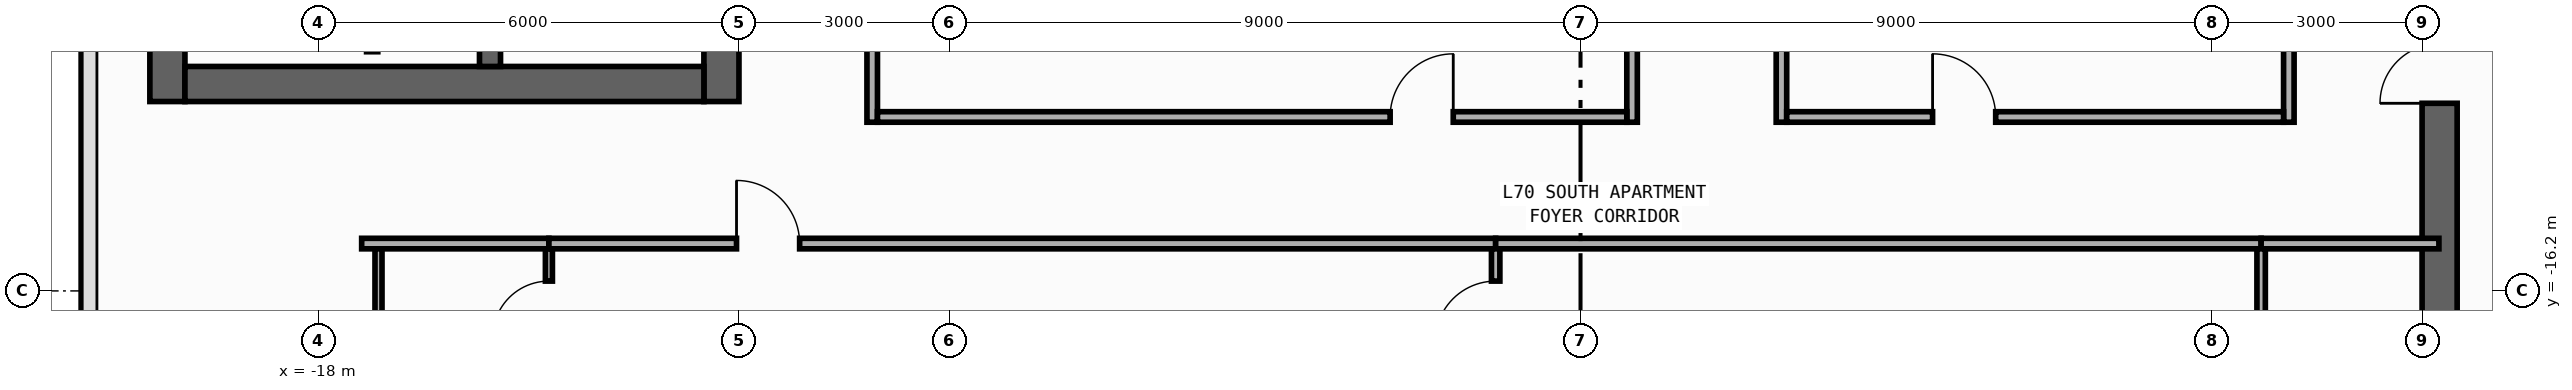
"""IFC4 building model, lengths in metres.
Left out: names, types, materials, properties, quantities, classifications, styles, units other than length and angle.
Written with IfcOpenShell. Run it as: python <this file> out.ifc"""

import sys

from ifc_helpers import new_model, si_unit, direction, frame, frame_2d, origin, place, context, subcontext, project, spatial, rectangle, extrude, element, fill, save


model = new_model("IFC4")
c1 = context("Model", 3, precision=1e-05, world=origin(), true_north=direction((0.0, 1.0)))
c2 = subcontext(c1, "Body", "Model", "MODEL_VIEW")
j1 = project(units=[si_unit("LENGTHUNIT", "METRE"), si_unit("PLANEANGLEUNIT", "RADIAN")], contexts=[c1])
p1 = place(None, origin())
s1 = spatial("IfcSite", under=j1, at=p1, CompositionType="ELEMENT")
p2 = place(p1, origin())
s2 = spatial("IfcBuilding", under=s1, at=p2, CompositionType="ELEMENT")
p3 = place(p2, frame((0.0, 0.0, 292.8)))
s3 = spatial("IfcBuildingStorey", under=s2, at=p3, CompositionType="ELEMENT", Elevation=292.8)
p4 = place(p3, frame((-20.15, -13.5, 0.0), z_axis=(0.0, 0.0, 1.0), x_axis=(0.0, 1.0, 0.0)))
e1 = element("IfcWall", 1, at=p4, inside=s3, PredefinedType="SHEAR", context=c2, shape_type="SweptSolid", body=[
    extrude(rectangle(XDim=27.0, YDim=0.5, at=frame_2d((13.5, 0.0))), origin(), (0.0, 0.0, 1.0), 3.54),
])
p5 = place(p3, frame((-12.25, -13.5, 0.0), z_axis=(0.0, 0.0, 1.0), x_axis=(0.0, 1.0, 0.0)))
e2 = element("IfcWall", 2, at=p5, inside=s3, PredefinedType="SHEAR", context=c2, shape_type="SweptSolid", body=[
    extrude(rectangle(XDim=27.0, YDim=0.5, at=frame_2d((13.5, 0.0))), origin(), (0.0, 0.0, 1.0), 3.54),
])
p6 = place(p5, frame((15.175, 0.0, 0.0)))
e3 = element("IfcOpeningElement", 3, at=p6, cuts=e2, PredefinedType="OPENING", context=c2, shape_type="SweptSolid", body=[
    extrude(rectangle(XDim=0.85, YDim=2.1, at=frame_2d((0.425, 1.05))), frame((0.0, 0.26, 0.0), z_axis=(0.0, -1.0, 0.0), x_axis=(1.0, 0.0, 0.0)), (0.0, 0.0, 1.0), 0.52),
])
p7 = place(p5, frame((21.275, 0.0, 0.0)))
e4 = element("IfcOpeningElement", 4, at=p7, cuts=e2, PredefinedType="OPENING", context=c2, shape_type="SweptSolid", body=[
    extrude(rectangle(XDim=0.85, YDim=2.1, at=frame_2d((0.425, 1.05))), frame((0.0, 0.26, 0.0), z_axis=(0.0, -1.0, 0.0), x_axis=(1.0, 0.0, 0.0)), (0.0, 0.0, 1.0), 0.52),
])
p8 = place(p5, frame((4.275, 0.0, 0.0)))
e5 = element("IfcOpeningElement", 5, at=p8, cuts=e2, PredefinedType="OPENING", context=c2, shape_type="SweptSolid", body=[
    extrude(rectangle(XDim=0.85, YDim=2.1, at=frame_2d((0.425, 1.05))), frame((0.0, 0.26, 0.0), z_axis=(0.0, -1.0, 0.0), x_axis=(1.0, 0.0, 0.0)), (0.0, 0.0, 1.0), 0.52),
])
p9 = place(p5, frame((10.275, 0.0, 0.0)))
e6 = element("IfcOpeningElement", 6, at=p9, cuts=e2, PredefinedType="OPENING", context=c2, shape_type="SweptSolid", body=[
    extrude(rectangle(XDim=0.85, YDim=2.1, at=frame_2d((0.425, 1.05))), frame((0.0, 0.26, 0.0), z_axis=(0.0, -1.0, 0.0), x_axis=(1.0, 0.0, 0.0)), (0.0, 0.0, 1.0), 0.52),
])
p10 = place(p5, frame((12.725, 0.0, 0.0)))
e7 = element("IfcOpeningElement", 7, at=p10, cuts=e2, PredefinedType="OPENING", context=c2, shape_type="SweptSolid", body=[
    extrude(rectangle(XDim=1.15, YDim=2.2, at=frame_2d((0.575, 1.1))), frame((0.0, 0.26, 0.0), z_axis=(0.0, -1.0, 0.0), x_axis=(1.0, 0.0, 0.0)), (0.0, 0.0, 1.0), 0.52),
])
p11 = place(p5, frame((1.625, 0.0, 0.0)))
e8 = element("IfcOpeningElement", 8, at=p11, cuts=e2, PredefinedType="OPENING", context=c2, shape_type="SweptSolid", body=[
    extrude(rectangle(XDim=0.85, YDim=2.1, at=frame_2d((0.425, 1.05))), frame((0.0, 0.26, 0.0), z_axis=(0.0, -1.0, 0.0), x_axis=(1.0, 0.0, 0.0)), (0.0, 0.0, 1.0), 0.52),
])
p12 = place(p3, frame((-19.9, -13.25, 0.0), z_axis=(0.0, 0.0, 1.0), x_axis=(1.0, 0.0, 0.0)))
e9 = element("IfcWall", 9, at=p12, inside=s3, PredefinedType="SHEAR", context=c2, shape_type="SweptSolid", body=[
    extrude(rectangle(XDim=7.4, YDim=0.5, at=frame_2d((3.7, 0.0))), origin(), (0.0, 0.0, 1.0), 3.54),
])
p13 = place(p3, frame((-15.55, -13.0, 0.0), z_axis=(0.0, 0.0, 1.0), x_axis=(0.0, 1.0, 0.0)))
e10 = element("IfcWall", 10, at=p13, inside=s3, PredefinedType="SHEAR", context=c2, shape_type="SweptSolid", body=[
    extrude(rectangle(XDim=26.0, YDim=0.3, at=frame_2d((13.0, 0.0))), origin(), (0.0, 0.0, 1.0), 3.54),
])
p14 = place(p13, frame((12.225, 0.0, 0.0)))
e11 = element("IfcOpeningElement", 11, at=p14, cuts=e10, PredefinedType="OPENING", context=c2, shape_type="SweptSolid", body=[
    extrude(rectangle(XDim=1.15, YDim=2.2, at=frame_2d((0.575, 1.1))), frame((0.0, 0.16, 0.0), z_axis=(0.0, -1.0, 0.0), x_axis=(1.0, 0.0, 0.0)), (0.0, 0.0, 1.0), 0.32),
])
p15 = place(p13, frame((1.125, 0.0, 0.0)))
e12 = element("IfcOpeningElement", 12, at=p15, cuts=e10, PredefinedType="OPENING", context=c2, shape_type="SweptSolid", body=[
    extrude(rectangle(XDim=0.85, YDim=2.1, at=frame_2d((0.425, 1.05))), frame((0.0, 0.16, 0.0), z_axis=(0.0, -1.0, 0.0), x_axis=(1.0, 0.0, 0.0)), (0.0, 0.0, 1.0), 0.32),
])
p16 = place(p3, frame((12.25, -19.8, 0.0), z_axis=(0.0, 0.0, 1.0), x_axis=(0.0, 1.0, 0.0)))
e13 = element("IfcWall", 13, at=p16, inside=s3, PredefinedType="SHEAR", context=c2, shape_type="SweptSolid", body=[
    extrude(rectangle(XDim=27.0, YDim=0.5, at=frame_2d((13.5, 0.0))), origin(), (0.0, 0.0, 1.0), 3.54),
])
p17 = place(p16, frame((23.05, 0.0, 0.0)))
e14 = element("IfcOpeningElement", 14, at=p17, cuts=e13, PredefinedType="OPENING", context=c2, shape_type="SweptSolid", body=[
    extrude(rectangle(XDim=1.1, YDim=2.2, at=frame_2d((0.55, 1.1))), frame((0.0, 0.26, 0.0), z_axis=(0.0, -1.0, 0.0), x_axis=(1.0, 0.0, 0.0)), (0.0, 0.0, 1.0), 0.52),
])
p18 = place(p16, frame((19.85, 0.0, 0.0)))
e15 = element("IfcOpeningElement", 15, at=p18, cuts=e13, PredefinedType="OPENING", context=c2, shape_type="SweptSolid", body=[
    extrude(rectangle(XDim=1.1, YDim=2.2, at=frame_2d((0.55, 1.1))), frame((0.0, 0.26, 0.0), z_axis=(0.0, -1.0, 0.0), x_axis=(1.0, 0.0, 0.0)), (0.0, 0.0, 1.0), 0.52),
])
p19 = place(p16, frame((16.65, 0.0, 0.0)))
e16 = element("IfcOpeningElement", 16, at=p19, cuts=e13, PredefinedType="OPENING", context=c2, shape_type="SweptSolid", body=[
    extrude(rectangle(XDim=1.1, YDim=2.2, at=frame_2d((0.55, 1.1))), frame((0.0, 0.26, 0.0), z_axis=(0.0, -1.0, 0.0), x_axis=(1.0, 0.0, 0.0)), (0.0, 0.0, 1.0), 0.52),
])
p20 = place(p16, frame((6.275, 0.0, 0.0)))
e17 = element("IfcOpeningElement", 17, at=p20, cuts=e13, PredefinedType="OPENING", context=c2, shape_type="SweptSolid", body=[
    extrude(rectangle(XDim=0.85, YDim=2.1, at=frame_2d((0.425, 1.05))), frame((0.0, 0.26, 0.0), z_axis=(0.0, -1.0, 0.0), x_axis=(1.0, 0.0, 0.0)), (0.0, 0.0, 1.0), 0.52),
])
p21 = place(p16, frame((8.575, 0.0, 0.0)))
e18 = element("IfcOpeningElement", 18, at=p21, cuts=e13, PredefinedType="OPENING", context=c2, shape_type="SweptSolid", body=[
    extrude(rectangle(XDim=0.85, YDim=2.1, at=frame_2d((0.425, 1.05))), frame((0.0, 0.26, 0.0), z_axis=(0.0, -1.0, 0.0), x_axis=(1.0, 0.0, 0.0)), (0.0, 0.0, 1.0), 0.52),
])
p22 = place(p16, frame((10.675, 0.0, 0.0)))
e19 = element("IfcOpeningElement", 19, at=p22, cuts=e13, PredefinedType="OPENING", context=c2, shape_type="SweptSolid", body=[
    extrude(rectangle(XDim=0.85, YDim=2.1, at=frame_2d((0.425, 1.05))), frame((0.0, 0.26, 0.0), z_axis=(0.0, -1.0, 0.0), x_axis=(1.0, 0.0, 0.0)), (0.0, 0.0, 1.0), 0.52),
])
p23 = place(p16, frame((12.725, 0.0, 0.0)))
e20 = element("IfcOpeningElement", 20, at=p23, cuts=e13, PredefinedType="OPENING", context=c2, shape_type="SweptSolid", body=[
    extrude(rectangle(XDim=1.15, YDim=2.2, at=frame_2d((0.575, 1.1))), frame((0.0, 0.26, 0.0), z_axis=(0.0, -1.0, 0.0), x_axis=(1.0, 0.0, 0.0)), (0.0, 0.0, 1.0), 0.52),
])
p24 = place(p16, frame((25.125, 0.0, 0.0)))
e21 = element("IfcOpeningElement", 21, at=p24, cuts=e13, PredefinedType="OPENING", context=c2, shape_type="SweptSolid", body=[
    extrude(rectangle(XDim=0.85, YDim=2.1, at=frame_2d((0.425, 1.05))), frame((0.0, 0.26, 0.0), z_axis=(0.0, -1.0, 0.0), x_axis=(1.0, 0.0, 0.0)), (0.0, 0.0, 1.0), 0.52),
])
p25 = place(p3, frame((-10.1, -13.795, 0.0), z_axis=(0.0, 0.0, 1.0), x_axis=(0.0, 1.0, 0.0)))
e22 = element("IfcWall", 22, at=p25, inside=s3, PredefinedType="PARTITIONING", context=c2, shape_type="SweptSolid", body=[
    extrude(rectangle(XDim=14.205, YDim=0.15, at=frame_2d((7.103, 0.0))), origin(), (0.0, 0.0, 1.0), 3.54),
])
p26 = place(p25, frame((7.972, 0.0, 0.0)))
e23 = element("IfcOpeningElement", 23, at=p26, cuts=e22, PredefinedType="OPENING", context=c2, shape_type="SweptSolid", body=[
    extrude(rectangle(XDim=0.9, YDim=2.15, at=frame_2d((0.45, 1.075))), frame((0.0, 0.085, 0.0), z_axis=(0.0, -1.0, 0.0), x_axis=(1.0, 0.0, 0.0)), (0.0, 0.0, 1.0), 0.17),
])
p27 = place(p3, frame((10.1, -13.795, 0.0), z_axis=(0.0, 0.0, 1.0), x_axis=(0.0, 1.0, 0.0)))
e24 = element("IfcWall", 24, at=p27, inside=s3, PredefinedType="PARTITIONING", context=c2, shape_type="SweptSolid", body=[
    extrude(rectangle(XDim=11.575, YDim=0.15, at=frame_2d((5.788, 0.0))), origin(), (0.0, 0.0, 1.0), 3.54),
])
p28 = place(p27, frame((7.979, 0.0, 0.0)))
e25 = element("IfcOpeningElement", 25, at=p28, cuts=e24, PredefinedType="OPENING", context=c2, shape_type="SweptSolid", body=[
    extrude(rectangle(XDim=0.9, YDim=2.15, at=frame_2d((0.45, 1.075))), frame((0.0, 0.085, 0.0), z_axis=(0.0, -1.0, 0.0), x_axis=(1.0, 0.0, 0.0)), (0.0, 0.0, 1.0), 0.17),
])
p29 = place(p3, frame((0.735, -13.795, 0.0), z_axis=(0.0, 0.0, 1.0), x_axis=(0.0, 1.0, 0.0)))
e26 = element("IfcWall", 26, at=p29, inside=s3, PredefinedType="PARTITIONING", context=c2, shape_type="SweptSolid", body=[
    extrude(rectangle(XDim=14.055, YDim=0.15, at=frame_2d((7.027, 0.0))), origin(), (0.0, 0.0, 1.0), 3.54),
])
p30 = place(p29, frame((7.881, 0.0, 0.0)))
e27 = element("IfcOpeningElement", 27, at=p30, cuts=e26, PredefinedType="OPENING", context=c2, shape_type="SweptSolid", body=[
    extrude(rectangle(XDim=0.9, YDim=2.15, at=frame_2d((0.45, 1.075))), frame((0.0, 0.085, 0.0), z_axis=(0.0, -1.0, 0.0), x_axis=(1.0, 0.0, 0.0)), (0.0, 0.0, 1.0), 0.17),
])
p31 = place(p3, frame((2.865, -13.795, 0.0), z_axis=(0.0, 0.0, 1.0), x_axis=(0.0, 1.0, 0.0)))
e28 = element("IfcWall", 28, at=p31, inside=s3, PredefinedType="PARTITIONING", context=c2, shape_type="SweptSolid", body=[
    extrude(rectangle(XDim=11.415, YDim=0.15, at=frame_2d((5.708, 0.0))), origin(), (0.0, 0.0, 1.0), 3.54),
])
p32 = place(p31, frame((8.013, 0.0, 0.0)))
e29 = element("IfcOpeningElement", 29, at=p32, cuts=e28, PredefinedType="OPENING", context=c2, shape_type="SweptSolid", body=[
    extrude(rectangle(XDim=0.9, YDim=2.15, at=frame_2d((0.45, 1.075))), frame((0.0, 0.085, 0.0), z_axis=(0.0, -1.0, 0.0), x_axis=(1.0, 0.0, 0.0)), (0.0, 0.0, 1.0), 0.17),
])
p33 = place(p3, frame((-17.38, -15.525, 0.0), z_axis=(0.0, 0.0, 1.0), x_axis=(1.0, 0.0, 0.0)))
e30 = element("IfcWall", 30, at=p33, inside=s3, PredefinedType="PARTITIONING", context=c2, shape_type="SweptSolid", body=[
    extrude(rectangle(XDim=2.67, YDim=0.15, at=frame_2d((1.335, 0.0))), origin(), (0.0, 0.0, 1.0), 3.54),
])
p34 = place(p3, frame((-14.71, -15.525, 0.0), z_axis=(0.0, 0.0, 1.0), x_axis=(1.0, 0.0, 0.0)))
e31 = element("IfcWall", 31, at=p34, inside=s3, PredefinedType="PARTITIONING", context=c2, shape_type="SweptSolid", body=[
    extrude(rectangle(XDim=13.5, YDim=0.15, at=frame_2d((6.75, 0.0))), origin(), (0.0, 0.0, 1.0), 3.54),
])
p35 = place(p34, frame((2.675, 0.0, 0.0)))
e32 = element("IfcOpeningElement", 32, at=p35, cuts=e31, PredefinedType="OPENING", context=c2, shape_type="SweptSolid", body=[
    extrude(rectangle(XDim=0.9, YDim=2.15, at=frame_2d((0.45, 1.075))), frame((0.0, 0.085, 0.0), z_axis=(0.0, -1.0, 0.0), x_axis=(1.0, 0.0, 0.0)), (0.0, 0.0, 1.0), 0.17),
])
p36 = place(p3, frame((-1.21, -15.525, 0.0), z_axis=(0.0, 0.0, 1.0), x_axis=(1.0, 0.0, 0.0)))
e33 = element("IfcWall", 33, at=p36, inside=s3, PredefinedType="PARTITIONING", context=c2, shape_type="SweptSolid", body=[
    extrude(rectangle(XDim=10.915, YDim=0.15, at=frame_2d((5.458, 0.0))), origin(), (0.0, 0.0, 1.0), 3.54),
])
p37 = place(p3, frame((9.705, -15.525, 0.0), z_axis=(0.0, 0.0, 1.0), x_axis=(1.0, 0.0, 0.0)))
e34 = element("IfcWall", 34, at=p37, inside=s3, PredefinedType="PARTITIONING", context=c2, shape_type="SweptSolid", body=[
    extrude(rectangle(XDim=2.535, YDim=0.15, at=frame_2d((1.268, 0.0))), origin(), (0.0, 0.0, 1.0), 3.54),
])
p38 = place(p3, frame((-10.025, -13.72, 0.0), z_axis=(0.0, 0.0, 1.0), x_axis=(1.0, 0.0, 0.0)))
e35 = element("IfcWall", 35, at=p38, inside=s3, PredefinedType="PARTITIONING", context=c2, shape_type="SweptSolid", body=[
    extrude(rectangle(XDim=10.685, YDim=0.15, at=frame_2d((5.342, 0.0))), origin(), (0.0, 0.0, 1.0), 3.54),
])
p39 = place(p38, frame((7.31, 0.0, 0.0)))
e36 = element("IfcOpeningElement", 36, at=p39, cuts=e35, PredefinedType="OPENING", context=c2, shape_type="SweptSolid", body=[
    extrude(rectangle(XDim=0.9, YDim=2.15, at=frame_2d((0.45, 1.075))), frame((0.0, 0.085, 0.0), z_axis=(0.0, -1.0, 0.0), x_axis=(1.0, 0.0, 0.0)), (0.0, 0.0, 1.0), 0.17),
])
p40 = place(p3, frame((2.94, -13.72, 0.0), z_axis=(0.0, 0.0, 1.0), x_axis=(1.0, 0.0, 0.0)))
e37 = element("IfcWall", 37, at=p40, inside=s3, PredefinedType="PARTITIONING", context=c2, shape_type="SweptSolid", body=[
    extrude(rectangle(XDim=7.085, YDim=0.15, at=frame_2d((3.542, 0.0))), origin(), (0.0, 0.0, 1.0), 3.54),
])
p41 = place(p40, frame((2.08, 0.0, 0.0)))
e38 = element("IfcOpeningElement", 38, at=p41, cuts=e37, PredefinedType="OPENING", context=c2, shape_type="SweptSolid", body=[
    extrude(rectangle(XDim=0.9, YDim=2.15, at=frame_2d((0.45, 1.075))), frame((0.0, 0.085, 0.0), z_axis=(0.0, -1.0, 0.0), x_axis=(1.0, 0.0, 0.0)), (0.0, 0.0, 1.0), 0.17),
])
p42 = place(p3, frame((-14.71, -18.1, 0.0), z_axis=(0.0, 0.0, 1.0), x_axis=(0.0, 1.0, 0.0)))
e39 = element("IfcWall", 39, at=p42, inside=s3, PredefinedType="PARTITIONING", context=c2, shape_type="SweptSolid", body=[
    extrude(rectangle(XDim=2.5, YDim=0.1, at=frame_2d((1.25, 0.0))), origin(), (0.0, 0.0, 1.0), 2.64),
])
p43 = place(p42, frame((1.24, 0.0, 0.0)))
e40 = element("IfcOpeningElement", 40, at=p43, cuts=e39, PredefinedType="OPENING", context=c2, shape_type="SweptSolid", body=[
    extrude(rectangle(XDim=0.8, YDim=2.1, at=frame_2d((0.4, 1.05))), frame((0.0, 0.06, 0.0), z_axis=(0.0, -1.0, 0.0), x_axis=(1.0, 0.0, 0.0)), (0.0, 0.0, 1.0), 0.12),
])
p44 = place(p3, frame((-1.21, -20.1, 0.0), z_axis=(0.0, 0.0, 1.0), x_axis=(0.0, 1.0, 0.0)))
e41 = element("IfcWall", 41, at=p44, inside=s3, PredefinedType="PARTITIONING", context=c2, shape_type="SweptSolid", body=[
    extrude(rectangle(XDim=4.5, YDim=0.12, at=frame_2d((2.25, 0.0))), origin(), (0.0, 0.0, 1.0), 3.54),
])
p45 = place(p44, frame((3.18, 0.0, 0.0)))
e42 = element("IfcOpeningElement", 42, at=p45, cuts=e41, PredefinedType="OPENING", context=c2, shape_type="SweptSolid", body=[
    extrude(rectangle(XDim=0.86, YDim=2.15, at=frame_2d((0.43, 1.075))), frame((0.0, 0.07, 0.0), z_axis=(0.0, -1.0, 0.0), x_axis=(1.0, 0.0, 0.0)), (0.0, 0.0, 1.0), 0.14),
])
p46 = place(p3, frame((9.705, -24.055, 0.0), z_axis=(0.0, 0.0, 1.0), x_axis=(0.0, 1.0, 0.0)))
e43 = element("IfcWall", 43, at=p46, inside=s3, PredefinedType="PARTITIONING", context=c2, shape_type="SweptSolid", body=[
    extrude(rectangle(XDim=8.455, YDim=0.12, at=frame_2d((4.228, 0.0))), origin(), (0.0, 0.0, 1.0), 3.54),
])
p47 = place(p46, frame((0.46, 0.0, 0.0)))
e44 = element("IfcOpeningElement", 44, at=p47, cuts=e43, PredefinedType="OPENING", context=c2, shape_type="SweptSolid", body=[
    extrude(rectangle(XDim=0.8, YDim=2.1, at=frame_2d((0.4, 1.05))), frame((0.0, 0.07, 0.0), z_axis=(0.0, -1.0, 0.0), x_axis=(1.0, 0.0, 0.0)), (0.0, 0.0, 1.0), 0.14),
])
p48 = place(p3, frame((-17.14, -18.05, 0.0), z_axis=(0.0, 0.0, 1.0), x_axis=(0.0, 1.0, 0.0)))
e45 = element("IfcWall", 45, at=p48, inside=s3, PredefinedType="PARTITIONING", context=c2, shape_type="SweptSolid", body=[
    extrude(rectangle(XDim=2.45, YDim=0.1, at=frame_2d((1.225, 0.0))), origin(), (0.0, 0.0, 1.0), 3.54),
])
p49 = place(p20, origin())
e46 = element("IfcDoor", 46, at=p49, inside=s3, OperationType="SINGLE_SWING_LEFT", PredefinedType="DOOR", context=c2, shape_type="SweptSolid", body=[
    extrude(rectangle(XDim=0.85, YDim=2.1, at=frame_2d((0.425, 1.05))), frame((0.0, 0.025, 0.0), z_axis=(0.0, -1.0, 0.0), x_axis=(1.0, 0.0, 0.0)), (0.0, 0.0, 1.0), 0.05),
])
fill(e17, e46)
p50 = place(p35, origin())
e47 = element("IfcDoor", 47, at=p50, inside=s3, OperationType="SINGLE_SWING_LEFT", PredefinedType="DOOR", context=c2, shape_type="SweptSolid", body=[
    extrude(rectangle(XDim=0.9, YDim=2.15, at=frame_2d((0.45, 1.075))), frame((0.0, 0.025, 0.0), z_axis=(0.0, -1.0, 0.0), x_axis=(1.0, 0.0, 0.0)), (0.0, 0.0, 1.0), 0.05),
])
fill(e32, e47)
p51 = place(p39, origin())
e48 = element("IfcDoor", 48, at=p51, inside=s3, OperationType="SINGLE_SWING_RIGHT", PredefinedType="DOOR", context=c2, shape_type="SweptSolid", body=[
    extrude(rectangle(XDim=0.9, YDim=2.15, at=frame_2d((0.45, 1.075))), frame((0.0, 0.025, 0.0), z_axis=(0.0, -1.0, 0.0), x_axis=(1.0, 0.0, 0.0)), (0.0, 0.0, 1.0), 0.05),
])
fill(e36, e48)
p52 = place(p41, origin())
e49 = element("IfcDoor", 49, at=p52, inside=s3, OperationType="SINGLE_SWING_LEFT", PredefinedType="DOOR", context=c2, shape_type="SweptSolid", body=[
    extrude(rectangle(XDim=0.9, YDim=2.15, at=frame_2d((0.45, 1.075))), frame((0.0, 0.025, 0.0), z_axis=(0.0, -1.0, 0.0), x_axis=(1.0, 0.0, 0.0)), (0.0, 0.0, 1.0), 0.05),
])
fill(e38, e49)
p53 = place(p43, origin())
e50 = element("IfcDoor", 50, at=p53, inside=s3, OperationType="SINGLE_SWING_LEFT", PredefinedType="DOOR", context=c2, shape_type="SweptSolid", body=[
    extrude(rectangle(XDim=0.8, YDim=2.1, at=frame_2d((0.4, 1.05))), frame((0.0, 0.025, 0.0), z_axis=(0.0, -1.0, 0.0), x_axis=(1.0, 0.0, 0.0)), (0.0, 0.0, 1.0), 0.05),
])
fill(e40, e50)
p54 = place(p45, origin())
e51 = element("IfcDoor", 51, at=p54, inside=s3, OperationType="SINGLE_SWING_LEFT", PredefinedType="DOOR", context=c2, shape_type="SweptSolid", body=[
    extrude(rectangle(XDim=0.86, YDim=2.15, at=frame_2d((0.43, 1.075))), frame((0.0, 0.025, 0.0), z_axis=(0.0, -1.0, 0.0), x_axis=(1.0, 0.0, 0.0)), (0.0, 0.0, 1.0), 0.05),
])
fill(e42, e51)
save(model, sys.argv[1])
